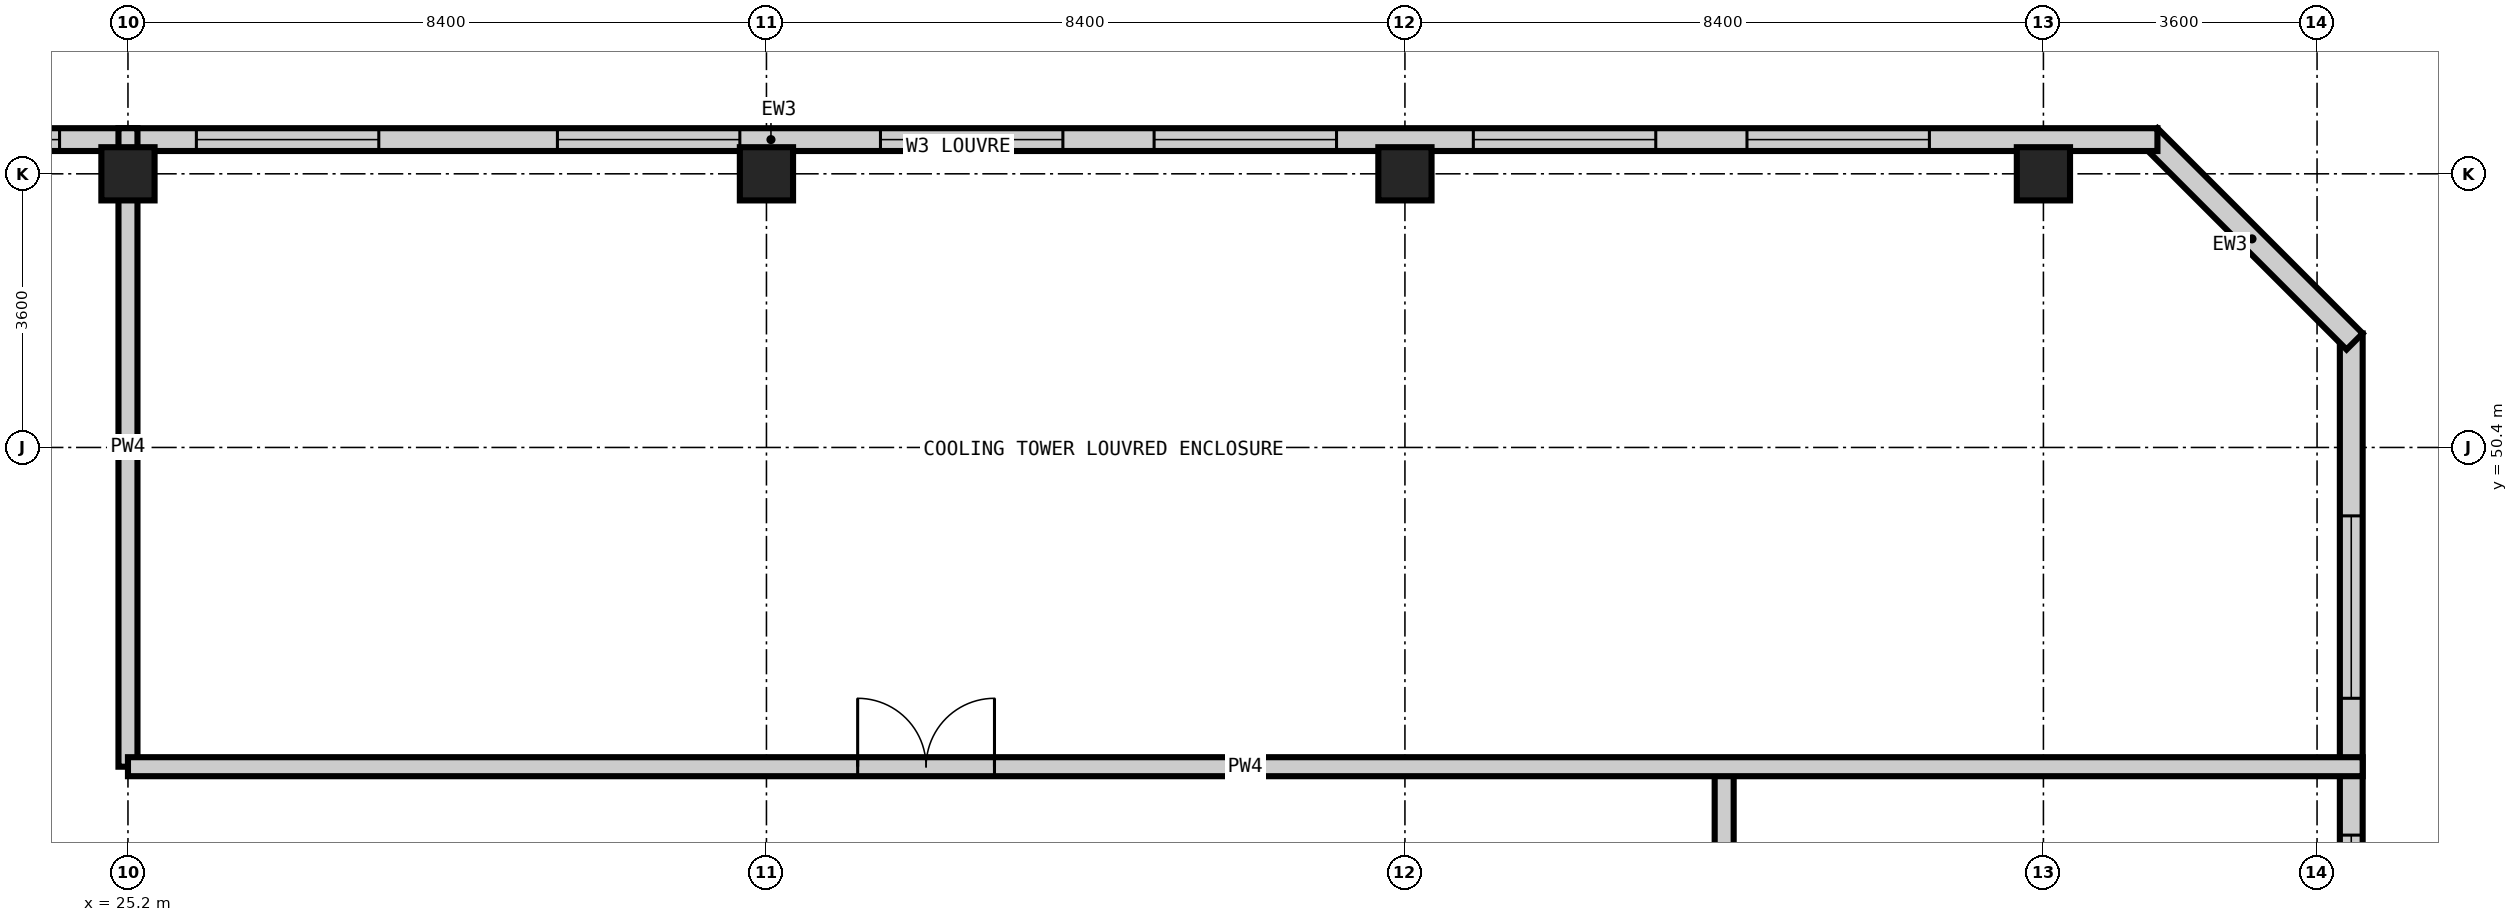
"""IFC4 building model, lengths in metres.
Left out: names, types, materials, properties, quantities, classifications, styles, units other than length and angle.
Written with IfcOpenShell. Run it as: python <this file> out.ifc"""

import sys

from ifc_helpers import new_model, si_unit, direction, frame, frame_2d, origin, origin_2d, place, context, subcontext, project, spatial, polyline, rectangle, hollow_rectangle, outline, extrude, element, fill, save


model = new_model("IFC4")
c1 = context("Model", 3, precision=1e-05, world=origin(), true_north=direction((0.0, 1.0)))
c2 = subcontext(c1, "Body", "Model", "MODEL_VIEW")
j1 = project(units=[si_unit("LENGTHUNIT", "METRE"), si_unit("PLANEANGLEUNIT", "RADIAN")], contexts=[c1])
p1 = place(None, origin())
s1 = spatial("IfcSite", under=j1, at=p1, CompositionType="ELEMENT")
p2 = place(p1, origin())
s2 = spatial("IfcBuilding", under=s1, at=p2, CompositionType="ELEMENT")
p3 = place(p2, frame((0.0, 0.0, 293.6)))
s3 = spatial("IfcBuildingStorey", under=s2, at=p3, CompositionType="ELEMENT", Elevation=293.6)
p4 = place(p3, frame((25.2, 54.0, -0.35), z_axis=(0.0, 0.0, 1.0), x_axis=(1.0, 0.0, 0.0)))
e1 = element("IfcColumn", 1, at=p4, inside=s3, PredefinedType="COLUMN", context=c2, shape_type="SweptSolid", body=[
    extrude(hollow_rectangle(XDim=0.7, YDim=0.7, WallThickness=0.06, at=origin_2d()), origin(), (0.0, 0.0, 1.0), 7.357),
])
p5 = place(p3, frame((33.6, 54.0, -0.35), z_axis=(0.0, 0.0, 1.0), x_axis=(1.0, 0.0, 0.0)))
e2 = element("IfcColumn", 2, at=p5, inside=s3, PredefinedType="COLUMN", context=c2, shape_type="SweptSolid", body=[
    extrude(hollow_rectangle(XDim=0.7, YDim=0.7, WallThickness=0.06, at=origin_2d()), origin(), (0.0, 0.0, 1.0), 9.607),
])
p6 = place(p3, frame((42.0, 54.0, -0.35), z_axis=(0.0, 0.0, 1.0), x_axis=(1.0, 0.0, 0.0)))
e3 = element("IfcColumn", 3, at=p6, inside=s3, PredefinedType="COLUMN", context=c2, shape_type="SweptSolid", body=[
    extrude(hollow_rectangle(XDim=0.7, YDim=0.7, WallThickness=0.06, at=origin_2d()), origin(), (0.0, 0.0, 1.0), 11.858),
])
p7 = place(p3, frame((50.4, 54.0, -0.35), z_axis=(0.0, 0.0, 1.0), x_axis=(1.0, 0.0, 0.0)))
e4 = element("IfcColumn", 4, at=p7, inside=s3, PredefinedType="COLUMN", context=c2, shape_type="SweptSolid", body=[
    extrude(hollow_rectangle(XDim=0.7, YDim=0.7, WallThickness=0.06, at=origin_2d()), origin(), (0.0, 0.0, 1.0), 14.109),
])
p8 = place(p3, frame((54.45, 6.9, 0.0), z_axis=(0.0, 0.0, 1.0), x_axis=(0.0, 1.0, 0.0)))
e5 = element("IfcWall", 5, at=p8, inside=s3, PredefinedType="SOLIDWALL", context=c2, shape_type="SweptSolid", body=[
    extrude(outline(polyline([(0.0, 0.0), (45.0, 0.0), (45.0, 15.455), (0.0, 15.455), (0.0, 0.0)])), frame((0.0, 0.15, 0.0), z_axis=(0.0, -1.0, 0.0), x_axis=(1.0, 0.0, 0.0)), (0.0, 0.0, 1.0), 0.3),
])
p9 = place(p8, frame((0.9, 0.0, 0.6)))
e6 = element("IfcOpeningElement", 6, at=p9, cuts=e5, PredefinedType="OPENING", context=c2, shape_type="SweptSolid", body=[
    extrude(rectangle(XDim=2.4, YDim=1.5, at=frame_2d((1.2, 0.75))), frame((0.0, 0.16, 0.0), z_axis=(0.0, -1.0, 0.0), x_axis=(1.0, 0.0, 0.0)), (0.0, 0.0, 1.0), 0.32),
])
p10 = place(p8, frame((6.6, 0.0, 0.6)))
e7 = element("IfcOpeningElement", 7, at=p10, cuts=e5, PredefinedType="OPENING", context=c2, shape_type="SweptSolid", body=[
    extrude(rectangle(XDim=2.4, YDim=1.5, at=frame_2d((1.2, 0.75))), frame((0.0, 0.16, 0.0), z_axis=(0.0, -1.0, 0.0), x_axis=(1.0, 0.0, 0.0)), (0.0, 0.0, 1.0), 0.32),
])
p11 = place(p8, frame((11.1, 0.0, 0.6)))
e8 = element("IfcOpeningElement", 8, at=p11, cuts=e5, PredefinedType="OPENING", context=c2, shape_type="SweptSolid", body=[
    extrude(rectangle(XDim=2.4, YDim=1.5, at=frame_2d((1.2, 0.75))), frame((0.0, 0.16, 0.0), z_axis=(0.0, -1.0, 0.0), x_axis=(1.0, 0.0, 0.0)), (0.0, 0.0, 1.0), 0.32),
])
p12 = place(p8, frame((15.0, 0.0, 0.6)))
e9 = element("IfcOpeningElement", 9, at=p12, cuts=e5, PredefinedType="OPENING", context=c2, shape_type="SweptSolid", body=[
    extrude(rectangle(XDim=2.4, YDim=1.5, at=frame_2d((1.2, 0.75))), frame((0.0, 0.16, 0.0), z_axis=(0.0, -1.0, 0.0), x_axis=(1.0, 0.0, 0.0)), (0.0, 0.0, 1.0), 0.32),
])
p13 = place(p8, frame((19.2, 0.0, 0.6)))
e10 = element("IfcOpeningElement", 10, at=p13, cuts=e5, PredefinedType="OPENING", context=c2, shape_type="SweptSolid", body=[
    extrude(rectangle(XDim=2.4, YDim=1.5, at=frame_2d((1.2, 0.75))), frame((0.0, 0.16, 0.0), z_axis=(0.0, -1.0, 0.0), x_axis=(1.0, 0.0, 0.0)), (0.0, 0.0, 1.0), 0.32),
])
p14 = place(p8, frame((23.1, 0.0, 0.6)))
e11 = element("IfcOpeningElement", 11, at=p14, cuts=e5, PredefinedType="OPENING", context=c2, shape_type="SweptSolid", body=[
    extrude(rectangle(XDim=2.4, YDim=1.5, at=frame_2d((1.2, 0.75))), frame((0.0, 0.16, 0.0), z_axis=(0.0, -1.0, 0.0), x_axis=(1.0, 0.0, 0.0)), (0.0, 0.0, 1.0), 0.32),
])
p15 = place(p8, frame((27.9, 0.0, 0.6)))
e12 = element("IfcOpeningElement", 12, at=p15, cuts=e5, PredefinedType="OPENING", context=c2, shape_type="SweptSolid", body=[
    extrude(rectangle(XDim=2.4, YDim=1.5, at=frame_2d((1.2, 0.75))), frame((0.0, 0.16, 0.0), z_axis=(0.0, -1.0, 0.0), x_axis=(1.0, 0.0, 0.0)), (0.0, 0.0, 1.0), 0.32),
])
p16 = place(p8, frame((31.8, 0.0, 0.6)))
e13 = element("IfcOpeningElement", 13, at=p16, cuts=e5, PredefinedType="OPENING", context=c2, shape_type="SweptSolid", body=[
    extrude(rectangle(XDim=2.4, YDim=1.5, at=frame_2d((1.2, 0.75))), frame((0.0, 0.16, 0.0), z_axis=(0.0, -1.0, 0.0), x_axis=(1.0, 0.0, 0.0)), (0.0, 0.0, 1.0), 0.32),
])
p17 = place(p8, frame((36.0, 0.0, 0.6)))
e14 = element("IfcOpeningElement", 14, at=p17, cuts=e5, PredefinedType="OPENING", context=c2, shape_type="SweptSolid", body=[
    extrude(rectangle(XDim=2.4, YDim=1.5, at=frame_2d((1.2, 0.75))), frame((0.0, 0.16, 0.0), z_axis=(0.0, -1.0, 0.0), x_axis=(1.0, 0.0, 0.0)), (0.0, 0.0, 1.0), 0.32),
])
p18 = place(p8, frame((40.2, 0.0, 0.6)))
e15 = element("IfcOpeningElement", 15, at=p18, cuts=e5, PredefinedType="OPENING", context=c2, shape_type="SweptSolid", body=[
    extrude(rectangle(XDim=2.4, YDim=1.5, at=frame_2d((1.2, 0.75))), frame((0.0, 0.16, 0.0), z_axis=(0.0, -1.0, 0.0), x_axis=(1.0, 0.0, 0.0)), (0.0, 0.0, 1.0), 0.32),
])
p19 = place(p3, frame((54.494, 51.794, 0.0), z_axis=(0.0, 0.0, 1.0), x_axis=(-0.707106781187, 0.707106781187, 0.0)))
e16 = element("IfcWall", 16, at=p19, inside=s3, PredefinedType="SOLIDWALL", context=c2, shape_type="SweptSolid", body=[
    extrude(outline(polyline([(0.0, 0.0), (3.818, 0.0), (3.818, 14.743), (0.0, 15.467), (0.0, 0.0)])), frame((0.0, 0.15, 0.0), z_axis=(0.0, -1.0, 0.0), x_axis=(1.0, 0.0, 0.0)), (0.0, 0.0, 1.0), 0.3),
])
p20 = place(p3, frame((51.9, 54.45, 0.0), z_axis=(0.0, 0.0, 1.0), x_axis=(-1.0, 0.0, 0.0)))
e17 = element("IfcWall", 17, at=p20, inside=s3, PredefinedType="SOLIDWALL", context=c2, shape_type="SweptSolid", body=[
    extrude(outline(polyline([(0.0, 0.0), (36.6, 0.0), (36.6, 4.965), (0.0, 14.771), (0.0, 0.0)])), frame((0.0, 0.15, 0.0), z_axis=(0.0, -1.0, 0.0), x_axis=(1.0, 0.0, 0.0)), (0.0, 0.0, 1.0), 0.3),
])
p21 = place(p20, frame((33.85, 0.0, 1.4)))
e18 = element("IfcOpeningElement", 18, at=p21, cuts=e17, PredefinedType="OPENING", context=c2, shape_type="SweptSolid", body=[
    extrude(rectangle(XDim=2.4, YDim=1.5, at=frame_2d((1.2, 0.75))), frame((0.0, 0.16, 0.0), z_axis=(0.0, -1.0, 0.0), x_axis=(1.0, 0.0, 0.0)), (0.0, 0.0, 1.0), 0.32),
])
p22 = place(p20, frame((27.6, 0.0, 0.6)))
e19 = element("IfcOpeningElement", 19, at=p22, cuts=e17, PredefinedType="OPENING", context=c2, shape_type="SweptSolid", body=[
    extrude(rectangle(XDim=2.4, YDim=1.5, at=frame_2d((1.2, 0.75))), frame((0.0, 0.16, 0.0), z_axis=(0.0, -1.0, 0.0), x_axis=(1.0, 0.0, 0.0)), (0.0, 0.0, 1.0), 0.32),
])
p23 = place(p20, frame((23.4, 0.0, 0.6)))
e20 = element("IfcOpeningElement", 20, at=p23, cuts=e17, PredefinedType="OPENING", context=c2, shape_type="SweptSolid", body=[
    extrude(rectangle(XDim=2.4, YDim=1.5, at=frame_2d((1.2, 0.75))), frame((0.0, 0.16, 0.0), z_axis=(0.0, -1.0, 0.0), x_axis=(1.0, 0.0, 0.0)), (0.0, 0.0, 1.0), 0.32),
])
p24 = place(p20, frame((18.65, 0.0, 2.6)))
e21 = element("IfcOpeningElement", 21, at=p24, cuts=e17, PredefinedType="OPENING", context=c2, shape_type="SweptSolid", body=[
    extrude(rectangle(XDim=2.4, YDim=1.5, at=frame_2d((1.2, 0.75))), frame((0.0, 0.16, 0.0), z_axis=(0.0, -1.0, 0.0), x_axis=(1.0, 0.0, 0.0)), (0.0, 0.0, 1.0), 0.32),
])
p25 = place(p20, frame((14.4, 0.0, 0.6)))
e22 = element("IfcOpeningElement", 22, at=p25, cuts=e17, PredefinedType="OPENING", context=c2, shape_type="SweptSolid", body=[
    extrude(rectangle(XDim=2.4, YDim=1.5, at=frame_2d((1.2, 0.75))), frame((0.0, 0.16, 0.0), z_axis=(0.0, -1.0, 0.0), x_axis=(1.0, 0.0, 0.0)), (0.0, 0.0, 1.0), 0.32),
])
p26 = place(p20, frame((10.8, 0.0, 0.6)))
e23 = element("IfcOpeningElement", 23, at=p26, cuts=e17, PredefinedType="OPENING", context=c2, shape_type="SweptSolid", body=[
    extrude(rectangle(XDim=2.4, YDim=1.5, at=frame_2d((1.2, 0.75))), frame((0.0, 0.16, 0.0), z_axis=(0.0, -1.0, 0.0), x_axis=(1.0, 0.0, 0.0)), (0.0, 0.0, 1.0), 0.32),
])
p27 = place(p20, frame((6.6, 0.0, 0.6)))
e24 = element("IfcOpeningElement", 24, at=p27, cuts=e17, PredefinedType="OPENING", context=c2, shape_type="SweptSolid", body=[
    extrude(rectangle(XDim=2.4, YDim=1.5, at=frame_2d((1.2, 0.75))), frame((0.0, 0.16, 0.0), z_axis=(0.0, -1.0, 0.0), x_axis=(1.0, 0.0, 0.0)), (0.0, 0.0, 1.0), 0.32),
])
p28 = place(p20, frame((3.0, 0.0, 0.6)))
e25 = element("IfcOpeningElement", 25, at=p28, cuts=e17, PredefinedType="OPENING", context=c2, shape_type="SweptSolid", body=[
    extrude(rectangle(XDim=2.4, YDim=1.5, at=frame_2d((1.2, 0.75))), frame((0.0, 0.16, 0.0), z_axis=(0.0, -1.0, 0.0), x_axis=(1.0, 0.0, 0.0)), (0.0, 0.0, 1.0), 0.32),
])
p29 = place(p3, frame((25.2, 46.2, 0.0), z_axis=(0.0, 0.0, 1.0), x_axis=(0.0, 1.0, 0.0)))
e26 = element("IfcWall", 26, at=p29, inside=s3, PredefinedType="PARTITIONING", context=c2, shape_type="SweptSolid", body=[
    extrude(outline(polyline([(0.0, 0.0), (8.4, 0.0), (8.4, 7.617), (0.0, 7.617), (0.0, 0.0)])), frame((0.0, 0.125, 0.0), z_axis=(0.0, -1.0, 0.0), x_axis=(1.0, 0.0, 0.0)), (0.0, 0.0, 1.0), 0.25),
])
p30 = place(p3, frame((46.2, 12.6, 0.0), z_axis=(0.0, 0.0, 1.0), x_axis=(0.0, 1.0, 0.0)))
e27 = element("IfcWall", 27, at=p30, inside=s3, PredefinedType="PARTITIONING", context=c2, shape_type="SweptSolid", body=[
    extrude(outline(polyline([(0.0, 0.0), (33.6, 0.0), (33.6, 13.244), (0.0, 13.244), (0.0, 0.0)])), frame((0.0, 0.125, 0.0), z_axis=(0.0, -1.0, 0.0), x_axis=(1.0, 0.0, 0.0)), (0.0, 0.0, 1.0), 0.25),
])
p31 = place(p30, frame((15.9, 0.0, 0.0)))
e28 = element("IfcOpeningElement", 28, at=p31, cuts=e27, PredefinedType="OPENING", context=c2, shape_type="SweptSolid", body=[
    extrude(rectangle(XDim=1.8, YDim=2.4, at=frame_2d((0.9, 1.2))), frame((0.0, 0.135, 0.0), z_axis=(0.0, -1.0, 0.0), x_axis=(1.0, 0.0, 0.0)), (0.0, 0.0, 1.0), 0.27),
])
p32 = place(p3, frame((25.2, 46.2, 0.0), z_axis=(0.0, 0.0, 1.0), x_axis=(1.0, 0.0, 0.0)))
e29 = element("IfcWall", 29, at=p32, inside=s3, PredefinedType="PARTITIONING", context=c2, shape_type="SweptSolid", body=[
    extrude(outline(polyline([(0.0, 0.0), (29.4, 0.0), (29.4, 15.495), (0.0, 7.617), (0.0, 0.0)])), frame((0.0, 0.125, 0.0), z_axis=(0.0, -1.0, 0.0), x_axis=(1.0, 0.0, 0.0)), (0.0, 0.0, 1.0), 0.25),
])
p33 = place(p32, frame((9.6, 0.0, 0.0)))
e30 = element("IfcOpeningElement", 30, at=p33, cuts=e29, PredefinedType="OPENING", context=c2, shape_type="SweptSolid", body=[
    extrude(rectangle(XDim=1.8, YDim=2.4, at=frame_2d((0.9, 1.2))), frame((0.0, 0.135, 0.0), z_axis=(0.0, -1.0, 0.0), x_axis=(1.0, 0.0, 0.0)), (0.0, 0.0, 1.0), 0.27),
])
p34 = place(p17, origin())
e31 = element("IfcWindow", 31, at=p34, inside=s3, PartitioningType="SINGLE_PANEL", PredefinedType="WINDOW", context=c2, shape_type="SweptSolid", body=[
    extrude(rectangle(XDim=2.4, YDim=1.5, at=frame_2d((1.2, 0.75))), frame((0.0, 0.03, 0.0), z_axis=(0.0, -1.0, 0.0), x_axis=(1.0, 0.0, 0.0)), (0.0, 0.0, 1.0), 0.06),
])
fill(e14, e31)
p35 = place(p18, origin())
e32 = element("IfcWindow", 32, at=p35, inside=s3, PartitioningType="SINGLE_PANEL", PredefinedType="WINDOW", context=c2, shape_type="SweptSolid", body=[
    extrude(rectangle(XDim=2.4, YDim=1.5, at=frame_2d((1.2, 0.75))), frame((0.0, 0.03, 0.0), z_axis=(0.0, -1.0, 0.0), x_axis=(1.0, 0.0, 0.0)), (0.0, 0.0, 1.0), 0.06),
])
fill(e15, e32)
p36 = place(p22, origin())
e33 = element("IfcWindow", 33, at=p36, inside=s3, PartitioningType="SINGLE_PANEL", PredefinedType="WINDOW", context=c2, shape_type="SweptSolid", body=[
    extrude(rectangle(XDim=2.4, YDim=1.5, at=frame_2d((1.2, 0.75))), frame((0.0, 0.03, 0.0), z_axis=(0.0, -1.0, 0.0), x_axis=(1.0, 0.0, 0.0)), (0.0, 0.0, 1.0), 0.06),
])
fill(e19, e33)
p37 = place(p23, origin())
e34 = element("IfcWindow", 34, at=p37, inside=s3, PartitioningType="SINGLE_PANEL", PredefinedType="WINDOW", context=c2, shape_type="SweptSolid", body=[
    extrude(rectangle(XDim=2.4, YDim=1.5, at=frame_2d((1.2, 0.75))), frame((0.0, 0.03, 0.0), z_axis=(0.0, -1.0, 0.0), x_axis=(1.0, 0.0, 0.0)), (0.0, 0.0, 1.0), 0.06),
])
fill(e20, e34)
p38 = place(p24, origin())
e35 = element("IfcWindow", 35, at=p38, inside=s3, PartitioningType="SINGLE_PANEL", PredefinedType="WINDOW", context=c2, shape_type="SweptSolid", body=[
    extrude(rectangle(XDim=2.4, YDim=1.5, at=frame_2d((1.2, 0.75))), frame((0.0, 0.03, 0.0), z_axis=(0.0, -1.0, 0.0), x_axis=(1.0, 0.0, 0.0)), (0.0, 0.0, 1.0), 0.06),
])
fill(e21, e35)
p39 = place(p25, origin())
e36 = element("IfcWindow", 36, at=p39, inside=s3, PartitioningType="SINGLE_PANEL", PredefinedType="WINDOW", context=c2, shape_type="SweptSolid", body=[
    extrude(rectangle(XDim=2.4, YDim=1.5, at=frame_2d((1.2, 0.75))), frame((0.0, 0.03, 0.0), z_axis=(0.0, -1.0, 0.0), x_axis=(1.0, 0.0, 0.0)), (0.0, 0.0, 1.0), 0.06),
])
fill(e22, e36)
p40 = place(p26, origin())
e37 = element("IfcWindow", 37, at=p40, inside=s3, PartitioningType="SINGLE_PANEL", PredefinedType="WINDOW", context=c2, shape_type="SweptSolid", body=[
    extrude(rectangle(XDim=2.4, YDim=1.5, at=frame_2d((1.2, 0.75))), frame((0.0, 0.03, 0.0), z_axis=(0.0, -1.0, 0.0), x_axis=(1.0, 0.0, 0.0)), (0.0, 0.0, 1.0), 0.06),
])
fill(e23, e37)
p41 = place(p27, origin())
e38 = element("IfcWindow", 38, at=p41, inside=s3, PartitioningType="SINGLE_PANEL", PredefinedType="WINDOW", context=c2, shape_type="SweptSolid", body=[
    extrude(rectangle(XDim=2.4, YDim=1.5, at=frame_2d((1.2, 0.75))), frame((0.0, 0.03, 0.0), z_axis=(0.0, -1.0, 0.0), x_axis=(1.0, 0.0, 0.0)), (0.0, 0.0, 1.0), 0.06),
])
fill(e24, e38)
p42 = place(p28, origin())
e39 = element("IfcWindow", 39, at=p42, inside=s3, PartitioningType="SINGLE_PANEL", PredefinedType="WINDOW", context=c2, shape_type="SweptSolid", body=[
    extrude(rectangle(XDim=2.4, YDim=1.5, at=frame_2d((1.2, 0.75))), frame((0.0, 0.03, 0.0), z_axis=(0.0, -1.0, 0.0), x_axis=(1.0, 0.0, 0.0)), (0.0, 0.0, 1.0), 0.06),
])
fill(e25, e39)
p43 = place(p33, origin())
e40 = element("IfcDoor", 40, at=p43, inside=s3, OperationType="DOUBLE_DOOR_DOUBLE_SWING", PredefinedType="DOOR", context=c2, shape_type="SweptSolid", body=[
    extrude(rectangle(XDim=1.8, YDim=2.4, at=frame_2d((0.9, 1.2))), frame((0.0, 0.025, 0.0), z_axis=(0.0, -1.0, 0.0), x_axis=(1.0, 0.0, 0.0)), (0.0, 0.0, 1.0), 0.05),
])
fill(e30, e40)
save(model, sys.argv[1])
